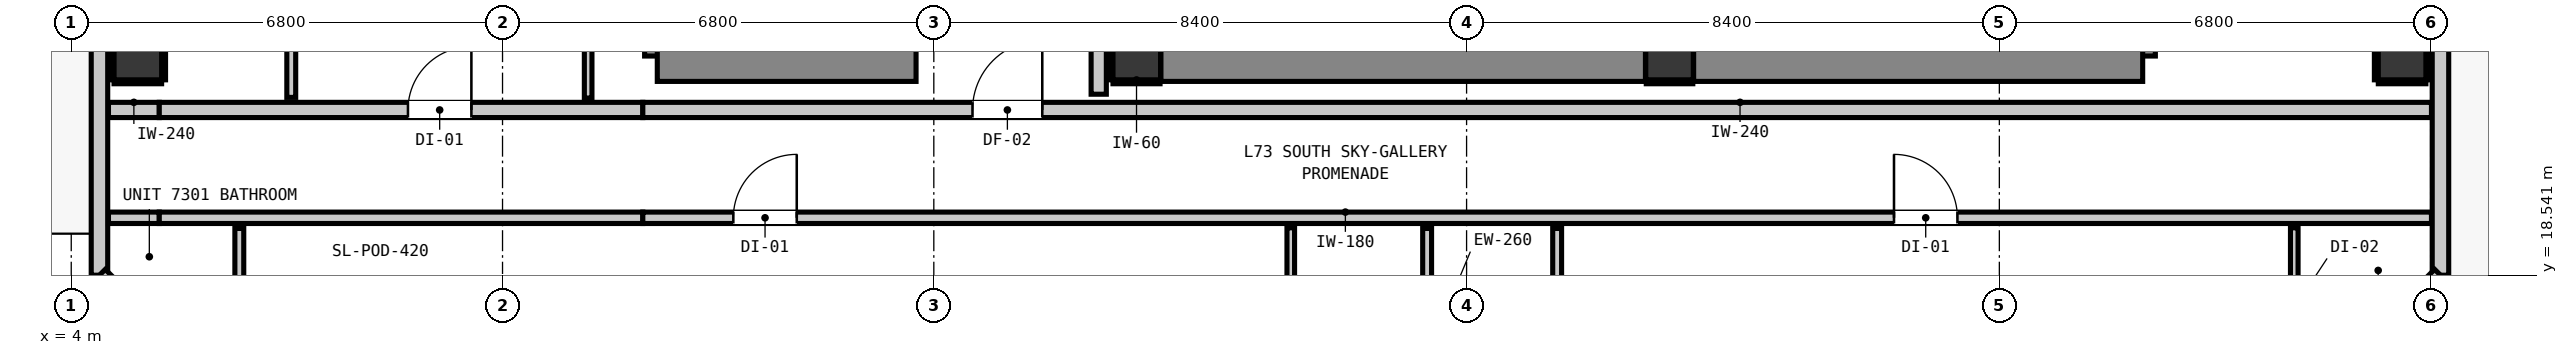
"""IFC4 building model, lengths in metres.
Left out: names, types, materials, properties, quantities, classifications, styles, units other than length and angle.
Written with IfcOpenShell. Run it as: python <this file> out.ifc"""

import sys

from ifc_helpers import new_model, si_unit, direction, frame, frame_2d, origin, origin_2d, place, context, subcontext, project, spatial, rectangle, extrude, element, fill, save


model = new_model("IFC4")
c1 = context("Model", 3, precision=1e-05, world=origin(), true_north=direction((0.0, 1.0)))
c2 = subcontext(c1, "Body", "Model", "MODEL_VIEW")
j1 = project(units=[si_unit("LENGTHUNIT", "METRE"), si_unit("PLANEANGLEUNIT", "RADIAN")], contexts=[c1])
p1 = place(None, origin())
s1 = spatial("IfcSite", under=j1, at=p1, CompositionType="ELEMENT")
p2 = place(p1, origin())
s2 = spatial("IfcBuilding", under=s1, at=p2, CompositionType="ELEMENT")
p3 = place(p2, frame((0.0, 0.0, 251.2)))
s3 = spatial("IfcBuildingStorey", under=s2, at=p3, CompositionType="ELEMENT", Elevation=251.2)
for number, where, z_axis, x_axis in (
    (1, (20.8, 22.0, 0.0), (0.0, 0.0, 1.0), (1.0, 0.0, 0.0)),
    (2, (29.2, 22.0, 0.0), (0.0, 0.0, 1.0), (1.0, 0.0, 0.0)),
):
    element("IfcColumn", number, at=place(p3, frame(where, z_axis=z_axis, x_axis=x_axis)), inside=s3, PredefinedType="COLUMN", context=c2, shape_type="SweptSolid", body=[
        extrude(rectangle(XDim=0.75, YDim=0.75, at=origin_2d()), origin(), (0.0, 0.0, 1.0), 3.32),
    ])
p4 = place(p3, frame((13.44, 22.0, 0.0), z_axis=(0.0, 0.0, 1.0), x_axis=(0.0, 1.0, 0.0)))
e3 = element("IfcWall", 3, at=p4, inside=s3, PredefinedType="SHEAR", context=c2, shape_type="SweptSolid", body=[
    extrude(rectangle(XDim=8.32, YDim=0.8, at=frame_2d((4.16, 0.0))), origin(), (0.0, 0.0, 1.0), 3.32),
])
p5 = place(p3, frame((13.24, 22.0, 0.0), z_axis=(0.0, 0.0, 1.0), x_axis=(1.0, 0.0, 0.0)))
e4 = element("IfcWall", 4, at=p5, inside=s3, PredefinedType="SHEAR", context=c2, shape_type="SweptSolid", body=[
    extrude(rectangle(XDim=4.08, YDim=0.8, at=frame_2d((2.04, 0.0))), origin(), (0.0, 0.0, 1.0), 3.32),
])
p6 = place(p3, frame((36.46, 22.0, 0.0), z_axis=(0.0, 0.0, 1.0), x_axis=(0.0, 1.0, 0.0)))
e5 = element("IfcWall", 5, at=p6, inside=s3, PredefinedType="SHEAR", context=c2, shape_type="SweptSolid", body=[
    extrude(rectangle(XDim=8.32, YDim=0.8, at=frame_2d((4.16, 0.0))), origin(), (0.0, 0.0, 1.0), 3.32),
])
p7 = place(p3, frame((29.58, 22.0, 0.0), z_axis=(0.0, 0.0, 1.0), x_axis=(1.0, 0.0, 0.0)))
e6 = element("IfcWall", 6, at=p7, inside=s3, PredefinedType="SHEAR", context=c2, shape_type="SweptSolid", body=[
    extrude(rectangle(XDim=7.08, YDim=0.8, at=frame_2d((3.54, 0.0))), origin(), (0.0, 0.0, 1.0), 3.32),
])
p8 = place(p3, frame((21.18, 22.0, 0.0), z_axis=(0.0, 0.0, 1.0), x_axis=(1.0, 0.0, 0.0)))
e7 = element("IfcWall", 7, at=p8, inside=s3, PredefinedType="SHEAR", context=c2, shape_type="SweptSolid", body=[
    extrude(rectangle(XDim=7.64, YDim=0.8, at=frame_2d((3.82, 0.0))), origin(), (0.0, 0.0, 1.0), 3.32),
])
for number, where, z_axis, x_axis in (
    (8, (5.05, 22.0, -0.2), (0.0, 0.0, 1.0), (1.0, 0.0, 0.0)),
    (9, (40.75, 22.0, -0.2), (0.0, 0.0, 1.0), (1.0, 0.0, 0.0)),
):
    element("IfcColumn", number, at=place(p3, frame(where, z_axis=z_axis, x_axis=x_axis)), inside=s3, PredefinedType="COLUMN", context=c2, shape_type="SweptSolid", body=[
        extrude(rectangle(XDim=0.75, YDim=0.75, at=origin_2d()), origin(), (0.0, 0.0, 1.0), 3.52),
    ])
p9 = place(p3, frame((4.445, 18.545, 0.0), z_axis=(0.0, 0.0, 1.0), x_axis=(0.0, 1.0, 0.0)))
e10 = element("IfcWall", 10, at=p9, inside=s3, PredefinedType="STANDARD", context=c2, shape_type="SweptSolid", body=[
    extrude(rectangle(XDim=30.31, YDim=0.26, at=frame_2d((15.155, 0.0))), origin(), (0.0, 0.0, 1.0), 3.1),
])
p10 = place(p9, frame((4.434, 0.0, 0.0)))
e11 = element("IfcOpeningElement", 11, at=p10, cuts=e10, PredefinedType="OPENING", context=c2, shape_type="SweptSolid", body=[
    extrude(rectangle(XDim=1.0, YDim=2.15, at=frame_2d((0.5, 1.075))), frame((0.0, 0.14, 0.0), z_axis=(0.0, -1.0, 0.0), x_axis=(1.0, 0.0, 0.0)), (0.0, 0.0, 1.0), 0.28),
])
p11 = place(p9, frame((27.866, 0.0, 0.85)))
e12 = element("IfcOpeningElement", 12, at=p11, cuts=e10, PredefinedType="OPENING", context=c2, shape_type="SweptSolid", body=[
    extrude(rectangle(XDim=1.8, YDim=1.9, at=frame_2d((0.9, 0.95))), frame((0.0, 0.14, 0.0), z_axis=(0.0, -1.0, 0.0), x_axis=(1.0, 0.0, 0.0)), (0.0, 0.0, 1.0), 0.28),
])
p12 = place(p3, frame((41.355, 48.855, 0.0), z_axis=(0.0, 0.0, 1.0), x_axis=(0.0, -1.0, 0.0)))
e13 = element("IfcWall", 13, at=p12, inside=s3, PredefinedType="STANDARD", context=c2, shape_type="SweptSolid", body=[
    extrude(rectangle(XDim=30.31, YDim=0.26, at=frame_2d((15.155, 0.0))), origin(), (0.0, 0.0, 1.0), 3.1),
])
p13 = place(p12, frame((0.507, 0.0, 0.0)))
e14 = element("IfcOpeningElement", 14, at=p13, cuts=e13, PredefinedType="OPENING", context=c2, shape_type="SweptSolid", body=[
    extrude(rectangle(XDim=1.1, YDim=2.15, at=frame_2d((0.55, 1.075))), frame((0.0, 0.14, 0.0), z_axis=(0.0, -1.0, 0.0), x_axis=(1.0, 0.0, 0.0)), (0.0, 0.0, 1.0), 0.28),
])
p14 = place(p12, frame((3.406, 0.0, 0.85)))
e15 = element("IfcOpeningElement", 15, at=p14, cuts=e13, PredefinedType="OPENING", context=c2, shape_type="SweptSolid", body=[
    extrude(rectangle(XDim=1.8, YDim=1.9, at=frame_2d((0.9, 0.95))), frame((0.0, 0.14, 0.0), z_axis=(0.0, -1.0, 0.0), x_axis=(1.0, 0.0, 0.0)), (0.0, 0.0, 1.0), 0.28),
])
for number, where, z_axis, x_axis in (
    (16, (41.355, 18.545, 0.0), (0.0, 0.0, 1.0), (-0.707, -0.707, 0.0)),
    (17, (6.545, 16.445, 0.0), (0.0, 0.0, 1.0), (-0.707, 0.707, 0.0)),
):
    element("IfcWall", number, at=place(p3, frame(where, z_axis=z_axis, x_axis=x_axis)), inside=s3, PredefinedType="STANDARD", context=c2, shape_type="SweptSolid", body=[
        extrude(rectangle(XDim=2.97, YDim=0.26, at=frame_2d((1.485, 0.0))), origin(), (0.0, 0.0, 1.0), 3.1),
    ])
p15 = place(p3, frame((4.587, 21.15, 0.0), z_axis=(0.0, 0.0, 1.0), x_axis=(1.0, 0.0, 0.0)))
e18 = element("IfcWall", 18, at=p15, inside=s3, PredefinedType="PARTITIONING", context=c2, shape_type="SweptSolid", body=[
    extrude(rectangle(XDim=0.801, YDim=0.24, at=frame_2d((0.4, 0.0))), origin(), (0.0, 0.0, 1.0), 3.1),
])
p16 = place(p3, frame((5.388, 21.15, 0.0), z_axis=(0.0, 0.0, 1.0), x_axis=(1.0, 0.0, 0.0)))
e19 = element("IfcWall", 19, at=p16, inside=s3, PredefinedType="PARTITIONING", context=c2, shape_type="SweptSolid", body=[
    extrude(rectangle(XDim=7.624, YDim=0.24, at=frame_2d((3.812, 0.0))), origin(), (0.0, 0.0, 1.0), 2.477),
])
p17 = place(p16, frame((3.921, 0.0, 0.0)))
e20 = element("IfcOpeningElement", 20, at=p17, cuts=e19, PredefinedType="OPENING", context=c2, shape_type="SweptSolid", body=[
    extrude(rectangle(XDim=1.0, YDim=2.15, at=frame_2d((0.5, 1.075))), frame((0.0, 0.13, 0.0), z_axis=(0.0, -1.0, 0.0), x_axis=(1.0, 0.0, 0.0)), (0.0, 0.0, 1.0), 0.26),
])
p18 = place(p3, frame((13.012, 21.15, 0.0), z_axis=(0.0, 0.0, 1.0), x_axis=(1.0, 0.0, 0.0)))
e21 = element("IfcWall", 21, at=p18, inside=s3, PredefinedType="PARTITIONING", context=c2, shape_type="SweptSolid", body=[
    extrude(rectangle(XDim=28.201, YDim=0.24, at=frame_2d((14.101, 0.0))), origin(), (0.0, 0.0, 1.0), 3.1),
])
p19 = place(p18, frame((5.198, 0.0, 0.0)))
e22 = element("IfcOpeningElement", 22, at=p19, cuts=e21, PredefinedType="OPENING", context=c2, shape_type="SweptSolid", body=[
    extrude(rectangle(XDim=1.1, YDim=2.15, at=frame_2d((0.55, 1.075))), frame((0.0, 0.13, 0.0), z_axis=(0.0, -1.0, 0.0), x_axis=(1.0, 0.0, 0.0)), (0.0, 0.0, 1.0), 0.26),
])
p20 = place(p3, frame((4.587, 19.45, 0.0), z_axis=(0.0, 0.0, 1.0), x_axis=(1.0, 0.0, 0.0)))
e23 = element("IfcWall", 23, at=p20, inside=s3, PredefinedType="PARTITIONING", context=c2, shape_type="SweptSolid", body=[
    extrude(rectangle(XDim=0.801, YDim=0.18, at=frame_2d((0.4, 0.0))), origin(), (0.0, 0.0, 1.0), 3.1),
])
p21 = place(p3, frame((5.388, 19.45, 0.0), z_axis=(0.0, 0.0, 1.0), x_axis=(1.0, 0.0, 0.0)))
e24 = element("IfcWall", 24, at=p21, inside=s3, PredefinedType="PARTITIONING", context=c2, shape_type="SweptSolid", body=[
    extrude(rectangle(XDim=7.624, YDim=0.18, at=frame_2d((3.812, 0.0))), origin(), (0.0, 0.0, 1.0), 2.477),
])
p22 = place(p3, frame((13.012, 19.45, 0.0), z_axis=(0.0, 0.0, 1.0), x_axis=(1.0, 0.0, 0.0)))
e25 = element("IfcWall", 25, at=p22, inside=s3, PredefinedType="PARTITIONING", context=c2, shape_type="SweptSolid", body=[
    extrude(rectangle(XDim=28.201, YDim=0.18, at=frame_2d((14.101, 0.0))), origin(), (0.0, 0.0, 1.0), 3.1),
])
p23 = place(p22, frame((1.427, 0.0, 0.0)))
e26 = element("IfcOpeningElement", 26, at=p23, cuts=e25, PredefinedType="OPENING", context=c2, shape_type="SweptSolid", body=[
    extrude(rectangle(XDim=1.0, YDim=2.15, at=frame_2d((0.5, 1.075))), frame((0.0, 0.1, 0.0), z_axis=(0.0, -1.0, 0.0), x_axis=(1.0, 0.0, 0.0)), (0.0, 0.0, 1.0), 0.2),
])
p24 = place(p22, frame((19.727, 0.0, 0.0)))
e27 = element("IfcOpeningElement", 27, at=p24, cuts=e25, PredefinedType="OPENING", context=c2, shape_type="SweptSolid", body=[
    extrude(rectangle(XDim=1.0, YDim=2.15, at=frame_2d((0.5, 1.075))), frame((0.0, 0.1, 0.0), z_axis=(0.0, -1.0, 0.0), x_axis=(1.0, 0.0, 0.0)), (0.0, 0.0, 1.0), 0.2),
])
p25 = place(p3, frame((20.2, 21.398, 0.0), z_axis=(0.0, 0.0, 1.0), x_axis=(0.0, 1.0, 0.0)))
e28 = element("IfcWall", 28, at=p25, inside=s3, PredefinedType="PARTITIONING", context=c2, shape_type="SweptSolid", body=[
    extrude(rectangle(XDim=6.754, YDim=0.24, at=frame_2d((3.377, 0.0))), origin(), (0.0, 0.0, 1.0), 3.1),
])
p26 = place(p3, frame((6.65, 16.587, 0.0), z_axis=(0.0, 0.0, 1.0), x_axis=(0.0, 1.0, 0.0)))
e29 = element("IfcWall", 29, at=p26, inside=s3, PredefinedType="PARTITIONING", context=c2, shape_type="SweptSolid", body=[
    extrude(rectangle(XDim=2.695, YDim=0.14, at=frame_2d((1.348, 0.0))), origin(), (0.0, 0.0, 1.0), 3.1),
])
p27 = place(p26, frame((1.008, 0.0, 0.0)))
e30 = element("IfcOpeningElement", 30, at=p27, cuts=e29, PredefinedType="OPENING", context=c2, shape_type="SweptSolid", body=[
    extrude(rectangle(XDim=0.86, YDim=2.02, at=frame_2d((0.43, 1.01))), frame((0.0, 0.08, 0.0), z_axis=(0.0, -1.0, 0.0), x_axis=(1.0, 0.0, 0.0)), (0.0, 0.0, 1.0), 0.16),
])
p28 = place(p3, frame((7.469, 21.348, 0.0), z_axis=(0.0, 0.0, 1.0), x_axis=(0.0, 1.0, 0.0)))
e31 = element("IfcWall", 31, at=p28, inside=s3, PredefinedType="PARTITIONING", context=c2, shape_type="SweptSolid", body=[
    extrude(rectangle(XDim=4.804, YDim=0.14, at=frame_2d((2.402, 0.0))), origin(), (0.0, 0.0, 1.0), 3.1),
])
p29 = place(p28, frame((1.94, 0.0, 0.0)))
e32 = element("IfcOpeningElement", 32, at=p29, cuts=e31, PredefinedType="OPENING", context=c2, shape_type="SweptSolid", body=[
    extrude(rectangle(XDim=0.9, YDim=2.1, at=frame_2d((0.45, 1.05))), frame((0.0, 0.08, 0.0), z_axis=(0.0, -1.0, 0.0), x_axis=(1.0, 0.0, 0.0)), (0.0, 0.0, 1.0), 0.16),
])
p30 = place(p3, frame((25.378, 16.587, 0.0), z_axis=(0.0, 0.0, 1.0), x_axis=(0.0, 1.0, 0.0)))
e33 = element("IfcWall", 33, at=p30, inside=s3, PredefinedType="PARTITIONING", context=c2, shape_type="SweptSolid", body=[
    extrude(rectangle(XDim=2.695, YDim=0.14, at=frame_2d((1.348, 0.0))), origin(), (0.0, 0.0, 1.0), 3.1),
])
p31 = place(p3, frame((27.428, 16.587, 0.0), z_axis=(0.0, 0.0, 1.0), x_axis=(0.0, 1.0, 0.0)))
e34 = element("IfcWall", 34, at=p31, inside=s3, PredefinedType="PARTITIONING", context=c2, shape_type="SweptSolid", body=[
    extrude(rectangle(XDim=2.695, YDim=0.14, at=frame_2d((1.348, 0.0))), origin(), (0.0, 0.0, 1.0), 3.1),
])
p32 = place(p31, frame((1.008, 0.0, 0.0)))
e35 = element("IfcOpeningElement", 35, at=p32, cuts=e34, PredefinedType="OPENING", context=c2, shape_type="SweptSolid", body=[
    extrude(rectangle(XDim=0.86, YDim=2.02, at=frame_2d((0.43, 1.01))), frame((0.0, 0.08, 0.0), z_axis=(0.0, -1.0, 0.0), x_axis=(1.0, 0.0, 0.0)), (0.0, 0.0, 1.0), 0.16),
])
p33 = place(p3, frame((12.15, 21.338, 0.0), z_axis=(0.0, 0.0, 1.0), x_axis=(0.0, 1.0, 0.0)))
e36 = element("IfcWall", 36, at=p33, inside=s3, PredefinedType="PARTITIONING", context=c2, shape_type="SweptSolid", body=[
    extrude(rectangle(XDim=10.154, YDim=0.12, at=frame_2d((5.077, 0.0))), origin(), (0.0, 0.0, 1.0), 3.1),
])
p34 = place(p3, frame((23.228, 16.587, 0.0), z_axis=(0.0, 0.0, 1.0), x_axis=(0.0, 1.0, 0.0)))
e37 = element("IfcWall", 37, at=p34, inside=s3, PredefinedType="PARTITIONING", context=c2, shape_type="SweptSolid", body=[
    extrude(rectangle(XDim=2.705, YDim=0.12, at=frame_2d((1.353, 0.0))), origin(), (0.0, 0.0, 1.0), 3.1),
])
p35 = place(p34, frame((0.988, 0.0, 0.0)))
e38 = element("IfcOpeningElement", 38, at=p35, cuts=e37, PredefinedType="OPENING", context=c2, shape_type="SweptSolid", body=[
    extrude(rectangle(XDim=0.9, YDim=2.1, at=frame_2d((0.45, 1.05))), frame((0.0, 0.07, 0.0), z_axis=(0.0, -1.0, 0.0), x_axis=(1.0, 0.0, 0.0)), (0.0, 0.0, 1.0), 0.14),
])
p36 = place(p3, frame((39.05, 16.587, 0.0), z_axis=(0.0, 0.0, 1.0), x_axis=(0.0, 1.0, 0.0)))
e39 = element("IfcWall", 39, at=p36, inside=s3, PredefinedType="PARTITIONING", context=c2, shape_type="SweptSolid", body=[
    extrude(rectangle(XDim=2.705, YDim=0.12, at=frame_2d((1.353, 0.0))), origin(), (0.0, 0.0, 1.0), 3.1),
])
p37 = place(p36, frame((0.988, 0.0, 0.0)))
e40 = element("IfcOpeningElement", 40, at=p37, cuts=e39, PredefinedType="OPENING", context=c2, shape_type="SweptSolid", body=[
    extrude(rectangle(XDim=0.9, YDim=2.1, at=frame_2d((0.45, 1.05))), frame((0.0, 0.07, 0.0), z_axis=(0.0, -1.0, 0.0), x_axis=(1.0, 0.0, 0.0)), (0.0, 0.0, 1.0), 0.14),
])
p38 = place(p3, frame((20.425, 21.593, 0.0), z_axis=(0.0, 0.0, 1.0), x_axis=(1.0, 0.0, 0.0)))
e41 = element("IfcWall", 41, at=p38, inside=s3, PredefinedType="PARTITIONING", context=c2, shape_type="SweptSolid", body=[
    extrude(rectangle(XDim=0.742, YDim=0.06, at=frame_2d((0.371, 0.0))), origin(), (0.0, 0.0, 1.0), 1.45),
])
p39 = place(p3, frame((20.393, 21.625, 0.0), z_axis=(0.0, 0.0, 1.0), x_axis=(0.0, 1.0, 0.0)))
e42 = element("IfcWall", 42, at=p39, inside=s3, PredefinedType="PARTITIONING", context=c2, shape_type="SweptSolid", body=[
    extrude(rectangle(XDim=0.75, YDim=0.06, at=frame_2d((0.375, 0.0))), origin(), (0.0, 0.0, 1.0), 1.45),
])
p40 = place(p3, frame((28.833, 21.593, 0.0), z_axis=(0.0, 0.0, 1.0), x_axis=(1.0, 0.0, 0.0)))
e43 = element("IfcWall", 43, at=p40, inside=s3, PredefinedType="PARTITIONING", context=c2, shape_type="SweptSolid", body=[
    extrude(rectangle(XDim=0.734, YDim=0.06, at=frame_2d((0.367, 0.0))), origin(), (0.0, 0.0, 1.0), 1.45),
])
for number, where, z_axis, x_axis in (
    (44, (4.675, 21.593, 0.0), (0.0, 0.0, 1.0), (1.0, 0.0, 0.0)),
    (45, (4.643, 21.625, 0.0), (0.0, 0.0, 1.0), (0.0, 1.0, 0.0)),
    (46, (5.457, 21.625, 0.0), (0.0, 0.0, 1.0), (0.0, 1.0, 0.0)),
    (47, (40.375, 21.593, 0.0), (0.0, 0.0, 1.0), (1.0, 0.0, 0.0)),
    (48, (40.343, 21.625, 0.0), (0.0, 0.0, 1.0), (0.0, 1.0, 0.0)),
    (49, (41.157, 21.625, 0.0), (0.0, 0.0, 1.0), (0.0, 1.0, 0.0)),
):
    element("IfcWall", number, at=place(p3, frame(where, z_axis=z_axis, x_axis=x_axis)), inside=s3, PredefinedType="PARTITIONING", context=c2, shape_type="SweptSolid", body=[
        extrude(rectangle(XDim=0.75, YDim=0.06, at=frame_2d((0.375, 0.0))), origin(), (0.0, 0.0, 1.0), 1.45),
    ])
p41 = place(p19, origin())
e50 = element("IfcDoor", 50, at=p41, inside=s3, OperationType="SINGLE_SWING_RIGHT", PredefinedType="DOOR", context=c2, shape_type="SweptSolid", body=[
    extrude(rectangle(XDim=1.1, YDim=2.15, at=frame_2d((0.55, 1.075))), frame((0.0, 0.025, 0.0), z_axis=(0.0, -1.0, 0.0), x_axis=(1.0, 0.0, 0.0)), (0.0, 0.0, 1.0), 0.05),
])
fill(e22, e50)
p42 = place(p23, origin())
e51 = element("IfcDoor", 51, at=p42, inside=s3, OperationType="SINGLE_SWING_RIGHT", PredefinedType="DOOR", context=c2, shape_type="SweptSolid", body=[
    extrude(rectangle(XDim=1.0, YDim=2.15, at=frame_2d((0.5, 1.075))), frame((0.0, 0.025, 0.0), z_axis=(0.0, -1.0, 0.0), x_axis=(1.0, 0.0, 0.0)), (0.0, 0.0, 1.0), 0.05),
])
fill(e26, e51)
p43 = place(p24, origin())
e52 = element("IfcDoor", 52, at=p43, inside=s3, OperationType="SINGLE_SWING_LEFT", PredefinedType="DOOR", context=c2, shape_type="SweptSolid", body=[
    extrude(rectangle(XDim=1.0, YDim=2.15, at=frame_2d((0.5, 1.075))), frame((0.0, 0.025, 0.0), z_axis=(0.0, -1.0, 0.0), x_axis=(1.0, 0.0, 0.0)), (0.0, 0.0, 1.0), 0.05),
])
fill(e27, e52)
p44 = place(p17, origin())
e53 = element("IfcDoor", 53, at=p44, inside=s3, OperationType="SINGLE_SWING_RIGHT", PredefinedType="DOOR", context=c2, shape_type="SweptSolid", body=[
    extrude(rectangle(XDim=1.0, YDim=2.15, at=frame_2d((0.5, 1.075))), frame((0.0, 0.025, 0.0), z_axis=(0.0, -1.0, 0.0), x_axis=(1.0, 0.0, 0.0)), (0.0, 0.0, 1.0), 0.05),
])
fill(e20, e53)
save(model, sys.argv[1])
